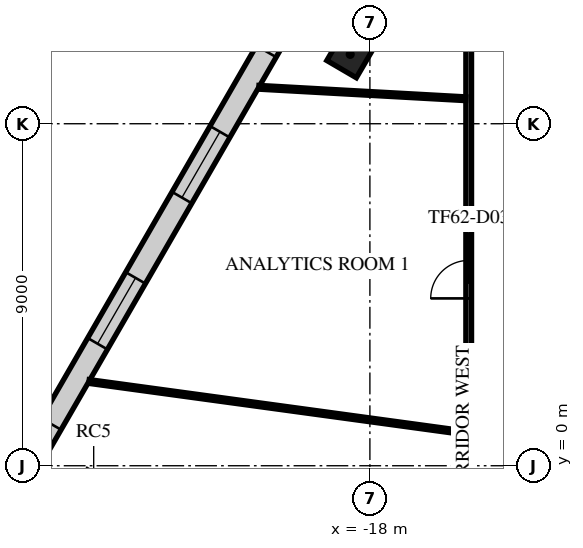
"""IFC4 building model, lengths in metres.
Left out: names, types, materials, properties, quantities, classifications, styles, units other than length and angle.
Written with IfcOpenShell. Run it as: python <this file> out.ifc"""

import sys

from ifc_helpers import new_model, si_unit, direction, frame, frame_2d, origin, origin_2d, place, context, subcontext, project, spatial, rectangle, extrude, element, fill, save


model = new_model("IFC4")
c1 = context("Model", 3, precision=1e-05, world=origin(), true_north=direction((0.0, 1.0)))
c2 = subcontext(c1, "Body", "Model", "MODEL_VIEW")
j1 = project(units=[si_unit("LENGTHUNIT", "METRE"), si_unit("PLANEANGLEUNIT", "RADIAN")], contexts=[c1])
p1 = place(None, origin())
s1 = spatial("IfcSite", under=j1, at=p1, CompositionType="ELEMENT")
p2 = place(p1, origin())
s2 = spatial("IfcBuilding", under=s1, at=p2, CompositionType="ELEMENT")
p3 = place(p2, frame((0.0, 0.0, 262.9)))
s3 = spatial("IfcBuildingStorey", under=s2, at=p3, CompositionType="ELEMENT", Elevation=262.9)
p4 = place(p3, frame((-18.518, 10.825, 0.0), z_axis=(0.0, 0.0, 1.0), x_axis=(0.504643651291, 0.863327739165, 0.0)))
e1 = element("IfcColumn", 1, at=p4, inside=s3, PredefinedType="COLUMN", context=c2, shape_type="SweptSolid", body=[
    extrude(rectangle(XDim=0.9, YDim=0.9, at=origin_2d()), origin(), (0.0, 0.0, 1.0), 4.0),
])
p5 = place(p3, frame((-8.015, 32.917, 0.0), z_axis=(0.0, 0.0, 1.0), x_axis=(-0.500001675963, -0.866024436165, 0.0)))
e2 = element("IfcWall", 2, at=p5, inside=s3, PredefinedType="STANDARD", context=c2, shape_type="SweptSolid", body=[
    extrude(rectangle(XDim=48.843, YDim=0.6, at=frame_2d((24.421, 0.0))), origin(), (0.0, 0.0, 1.0), 3.64),
])
p6 = place(p5, frame((1.22, 0.0, 0.9)))
e3 = element("IfcOpeningElement", 3, at=p6, cuts=e2, PredefinedType="OPENING", context=c2, shape_type="SweptSolid", body=[
    extrude(rectangle(XDim=2.0, YDim=2.1, at=frame_2d((1.0, 1.05))), frame((0.0, 0.31, 0.0), z_axis=(0.0, -1.0, 0.0), x_axis=(1.0, 0.0, 0.0)), (0.0, 0.0, 1.0), 0.62),
])
p7 = place(p5, frame((5.66, 0.0, 0.9)))
e4 = element("IfcOpeningElement", 4, at=p7, cuts=e2, PredefinedType="OPENING", context=c2, shape_type="SweptSolid", body=[
    extrude(rectangle(XDim=2.0, YDim=2.1, at=frame_2d((1.0, 1.05))), frame((0.0, 0.31, 0.0), z_axis=(0.0, -1.0, 0.0), x_axis=(1.0, 0.0, 0.0)), (0.0, 0.0, 1.0), 0.62),
])
p8 = place(p5, frame((10.101, 0.0, 0.9)))
e5 = element("IfcOpeningElement", 5, at=p8, cuts=e2, PredefinedType="OPENING", context=c2, shape_type="SweptSolid", body=[
    extrude(rectangle(XDim=2.0, YDim=2.1, at=frame_2d((1.0, 1.05))), frame((0.0, 0.31, 0.0), z_axis=(0.0, -1.0, 0.0), x_axis=(1.0, 0.0, 0.0)), (0.0, 0.0, 1.0), 0.62),
])
p9 = place(p5, frame((14.541, 0.0, 0.9)))
e6 = element("IfcOpeningElement", 6, at=p9, cuts=e2, PredefinedType="OPENING", context=c2, shape_type="SweptSolid", body=[
    extrude(rectangle(XDim=2.0, YDim=2.1, at=frame_2d((1.0, 1.05))), frame((0.0, 0.31, 0.0), z_axis=(0.0, -1.0, 0.0), x_axis=(1.0, 0.0, 0.0)), (0.0, 0.0, 1.0), 0.62),
])
p10 = place(p5, frame((18.981, 0.0, 0.9)))
e7 = element("IfcOpeningElement", 7, at=p10, cuts=e2, PredefinedType="OPENING", context=c2, shape_type="SweptSolid", body=[
    extrude(rectangle(XDim=2.0, YDim=2.1, at=frame_2d((1.0, 1.05))), frame((0.0, 0.31, 0.0), z_axis=(0.0, -1.0, 0.0), x_axis=(1.0, 0.0, 0.0)), (0.0, 0.0, 1.0), 0.62),
])
p11 = place(p5, frame((23.422, 0.0, 0.9)))
e8 = element("IfcOpeningElement", 8, at=p11, cuts=e2, PredefinedType="OPENING", context=c2, shape_type="SweptSolid", body=[
    extrude(rectangle(XDim=2.0, YDim=2.1, at=frame_2d((1.0, 1.05))), frame((0.0, 0.31, 0.0), z_axis=(0.0, -1.0, 0.0), x_axis=(1.0, 0.0, 0.0)), (0.0, 0.0, 1.0), 0.62),
])
p12 = place(p5, frame((27.862, 0.0, 0.9)))
e9 = element("IfcOpeningElement", 9, at=p12, cuts=e2, PredefinedType="OPENING", context=c2, shape_type="SweptSolid", body=[
    extrude(rectangle(XDim=2.0, YDim=2.1, at=frame_2d((1.0, 1.05))), frame((0.0, 0.31, 0.0), z_axis=(0.0, -1.0, 0.0), x_axis=(1.0, 0.0, 0.0)), (0.0, 0.0, 1.0), 0.62),
])
p13 = place(p5, frame((32.302, 0.0, 0.9)))
e10 = element("IfcOpeningElement", 10, at=p13, cuts=e2, PredefinedType="OPENING", context=c2, shape_type="SweptSolid", body=[
    extrude(rectangle(XDim=2.0, YDim=2.1, at=frame_2d((1.0, 1.05))), frame((0.0, 0.31, 0.0), z_axis=(0.0, -1.0, 0.0), x_axis=(1.0, 0.0, 0.0)), (0.0, 0.0, 1.0), 0.62),
])
p14 = place(p5, frame((36.742, 0.0, 0.9)))
e11 = element("IfcOpeningElement", 11, at=p14, cuts=e2, PredefinedType="OPENING", context=c2, shape_type="SweptSolid", body=[
    extrude(rectangle(XDim=2.0, YDim=2.1, at=frame_2d((1.0, 1.05))), frame((0.0, 0.31, 0.0), z_axis=(0.0, -1.0, 0.0), x_axis=(1.0, 0.0, 0.0)), (0.0, 0.0, 1.0), 0.62),
])
p15 = place(p5, frame((41.183, 0.0, 0.9)))
e12 = element("IfcOpeningElement", 12, at=p15, cuts=e2, PredefinedType="OPENING", context=c2, shape_type="SweptSolid", body=[
    extrude(rectangle(XDim=2.0, YDim=2.1, at=frame_2d((1.0, 1.05))), frame((0.0, 0.31, 0.0), z_axis=(0.0, -1.0, 0.0), x_axis=(1.0, 0.0, 0.0)), (0.0, 0.0, 1.0), 0.62),
])
p16 = place(p5, frame((45.623, 0.0, 0.9)))
e13 = element("IfcOpeningElement", 13, at=p16, cuts=e2, PredefinedType="OPENING", context=c2, shape_type="SweptSolid", body=[
    extrude(rectangle(XDim=2.0, YDim=2.1, at=frame_2d((1.0, 1.05))), frame((0.0, 0.31, 0.0), z_axis=(0.0, -1.0, 0.0), x_axis=(1.0, 0.0, 0.0)), (0.0, 0.0, 1.0), 0.62),
])
p17 = place(p3, frame((-15.4, -10.72, 0.0), z_axis=(0.0, 0.0, 1.0), x_axis=(0.0, 1.0, 0.0)))
e14 = element("IfcWall", 14, at=p17, inside=s3, PredefinedType="PARTITIONING", context=c2, shape_type="SweptSolid", body=[
    extrude(rectangle(XDim=26.12, YDim=0.15, at=frame_2d((13.06, 0.0))), origin(), (0.0, 0.0, 1.0), 3.24),
])
p18 = place(p17, frame((1.05, 0.0, 0.0)))
e15 = element("IfcOpeningElement", 15, at=p18, cuts=e14, PredefinedType="OPENING", context=c2, shape_type="SweptSolid", body=[
    extrude(rectangle(XDim=1.0, YDim=2.1, at=frame_2d((0.5, 1.05))), frame((0.0, 0.085, 0.0), z_axis=(0.0, -1.0, 0.0), x_axis=(1.0, 0.0, 0.0)), (0.0, 0.0, 1.0), 0.17),
])
p19 = place(p17, frame((15.124, 0.0, 0.0)))
e16 = element("IfcOpeningElement", 16, at=p19, cuts=e14, PredefinedType="OPENING", context=c2, shape_type="SweptSolid", body=[
    extrude(rectangle(XDim=1.0, YDim=2.1, at=frame_2d((0.5, 1.05))), frame((0.0, 0.085, 0.0), z_axis=(0.0, -1.0, 0.0), x_axis=(1.0, 0.0, 0.0)), (0.0, 0.0, 1.0), 0.17),
])
p20 = place(p3, frame((-25.391, 2.217, 0.0), z_axis=(0.0, 0.0, 1.0), x_axis=(0.990810103631, -0.135260262244, 0.0)))
e17 = element("IfcWall", 17, at=p20, inside=s3, PredefinedType="PARTITIONING", context=c2, shape_type="SweptSolid", body=[
    extrude(rectangle(XDim=10.001, YDim=0.1, at=frame_2d((5.0, 0.0))), origin(), (0.0, 0.0, 1.0), 3.04),
])
p21 = place(p3, frame((-20.922, 9.959, 0.0), z_axis=(0.0, 0.0, 1.0), x_axis=(0.998469707991, -0.055301376328, 0.0)))
e18 = element("IfcWall", 18, at=p21, inside=s3, PredefinedType="PARTITIONING", context=c2, shape_type="SweptSolid", body=[
    extrude(rectangle(XDim=5.452, YDim=0.1, at=frame_2d((2.726, 0.0))), origin(), (0.0, 0.0, 1.0), 3.04),
])
p22 = place(p12, origin())
e19 = element("IfcWindow", 19, at=p22, inside=s3, PartitioningType="SINGLE_PANEL", PredefinedType="WINDOW", context=c2, shape_type="SweptSolid", body=[
    extrude(rectangle(XDim=2.0, YDim=2.1, at=frame_2d((1.0, 1.05))), frame((0.0, 0.03, 0.0), z_axis=(0.0, -1.0, 0.0), x_axis=(1.0, 0.0, 0.0)), (0.0, 0.0, 1.0), 0.06),
])
fill(e9, e19)
p23 = place(p13, origin())
e20 = element("IfcWindow", 20, at=p23, inside=s3, PartitioningType="SINGLE_PANEL", PredefinedType="WINDOW", context=c2, shape_type="SweptSolid", body=[
    extrude(rectangle(XDim=2.0, YDim=2.1, at=frame_2d((1.0, 1.05))), frame((0.0, 0.03, 0.0), z_axis=(0.0, -1.0, 0.0), x_axis=(1.0, 0.0, 0.0)), (0.0, 0.0, 1.0), 0.06),
])
fill(e10, e20)
p24 = place(p19, origin())
e21 = element("IfcDoor", 21, at=p24, inside=s3, OperationType="SINGLE_SWING_RIGHT", PredefinedType="DOOR", context=c2, shape_type="SweptSolid", body=[
    extrude(rectangle(XDim=1.0, YDim=2.1, at=frame_2d((0.5, 1.05))), frame((0.0, 0.025, 0.0), z_axis=(0.0, -1.0, 0.0), x_axis=(1.0, 0.0, 0.0)), (0.0, 0.0, 1.0), 0.05),
])
fill(e16, e21)
save(model, sys.argv[1])
